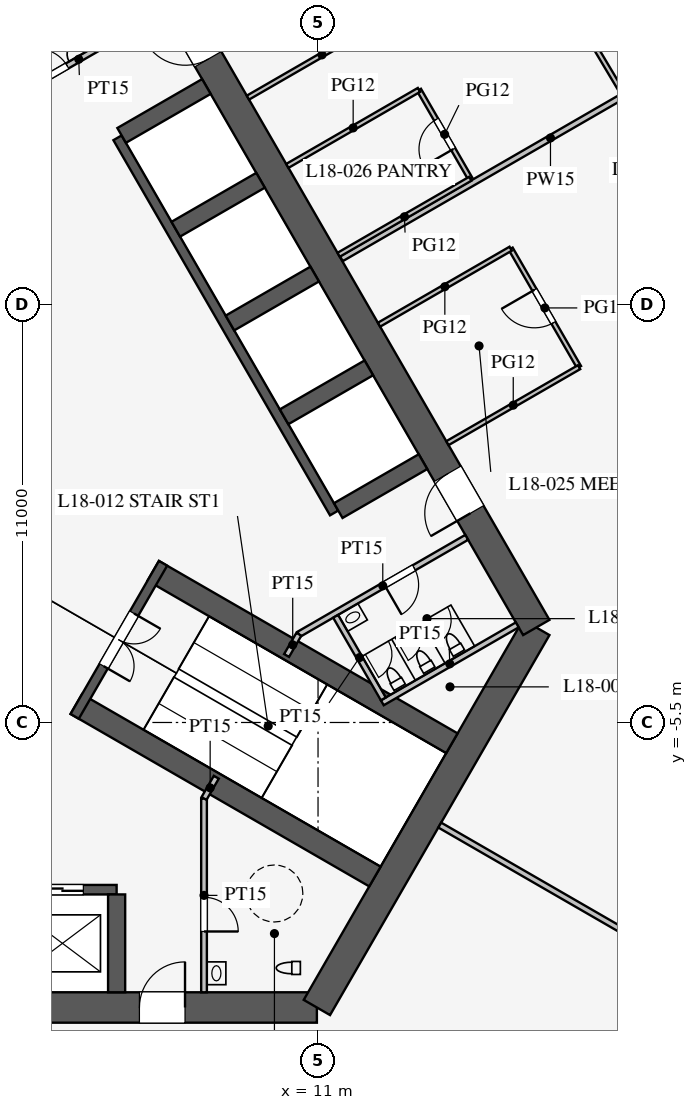
"""IFC4 building model, lengths in metres.
Left out: names, types, materials, properties, quantities, classifications, styles, units other than length and angle.
Written with IfcOpenShell. Run it as: python <this file> out.ifc"""

import sys

from ifc_helpers import new_model, si_unit, direction, frame, frame_2d, origin, place, context, subcontext, project, spatial, rectangle, extrude, element, fill, save


model = new_model("IFC4")
c1 = context("Model", 3, precision=1e-05, world=origin(), true_north=direction((0.0, 1.0)))
c2 = subcontext(c1, "Body", "Model", "MODEL_VIEW")
j1 = project(units=[si_unit("LENGTHUNIT", "METRE"), si_unit("PLANEANGLEUNIT", "RADIAN")], contexts=[c1])
p1 = place(None, origin())
s1 = spatial("IfcSite", under=j1, at=p1, CompositionType="ELEMENT")
p2 = place(p1, origin())
s2 = spatial("IfcBuilding", under=s1, at=p2, CompositionType="ELEMENT")
p3 = place(p2, frame((0.0, 0.0, 79.5)))
s3 = spatial("IfcBuildingStorey", under=s2, at=p3, CompositionType="ELEMENT", Elevation=79.5)
p4 = place(p3, frame((-10.97, -13.0, 0.0), z_axis=(0.0, 0.0, 1.0), x_axis=(1.0, 0.0, 0.0)))
e1 = element("IfcWall", 1, at=p4, inside=s3, PredefinedType="SHEAR", context=c2, shape_type="SweptSolid", body=[
    extrude(rectangle(XDim=21.939, YDim=0.8, at=frame_2d((10.97, 0.0))), origin(), (0.0, 0.0, 1.0), 4.2),
])
p5 = place(p4, frame((17.27, 0.0, 0.0)))
e2 = element("IfcOpeningElement", 2, at=p5, cuts=e1, PredefinedType="OPENING", context=c2, shape_type="SweptSolid", body=[
    extrude(rectangle(XDim=1.2, YDim=2.1, at=frame_2d((0.6, 1.05))), frame((0.0, 0.41, 0.0), z_axis=(0.0, -1.0, 0.0), x_axis=(1.0, 0.0, 0.0)), (0.0, 0.0, 1.0), 0.82),
])
p6 = place(p4, frame((3.47, 0.0, 0.0)))
e3 = element("IfcOpeningElement", 3, at=p6, cuts=e1, PredefinedType="OPENING", context=c2, shape_type="SweptSolid", body=[
    extrude(rectangle(XDim=1.2, YDim=2.1, at=frame_2d((0.6, 1.05))), frame((0.0, 0.41, 0.0), z_axis=(0.0, -1.0, 0.0), x_axis=(1.0, 0.0, 0.0)), (0.0, 0.0, 1.0), 0.82),
])
p7 = place(p3, frame((10.97, -13.0, 0.0), z_axis=(0.0, 0.0, 1.0), x_axis=(0.499995765644, 0.866027848477, 0.0)))
e4 = element("IfcWall", 4, at=p7, inside=s3, PredefinedType="SHEAR", context=c2, shape_type="SweptSolid", body=[
    extrude(rectangle(XDim=11.547, YDim=0.8, at=frame_2d((5.773, 0.0))), origin(), (0.0, 0.0, 1.0), 4.2),
])
p8 = place(p3, frame((16.743, -3.0, 0.0), z_axis=(0.0, 0.0, 1.0), x_axis=(-0.500002442456, 0.866023993627, 0.0)))
e5 = element("IfcWall", 5, at=p8, inside=s3, PredefinedType="SHEAR", context=c2, shape_type="SweptSolid", body=[
    extrude(rectangle(XDim=21.939, YDim=0.8, at=frame_2d((10.97, 0.0))), origin(), (0.0, 0.0, 1.0), 4.2),
])
p9 = place(p8, frame((17.27, 0.0, 0.0)))
e6 = element("IfcOpeningElement", 6, at=p9, cuts=e5, PredefinedType="OPENING", context=c2, shape_type="SweptSolid", body=[
    extrude(rectangle(XDim=1.2, YDim=2.1, at=frame_2d((0.6, 1.05))), frame((0.0, 0.41, 0.0), z_axis=(0.0, -1.0, 0.0), x_axis=(1.0, 0.0, 0.0)), (0.0, 0.0, 1.0), 0.82),
])
p10 = place(p8, frame((3.47, 0.0, 0.0)))
e7 = element("IfcOpeningElement", 7, at=p10, cuts=e5, PredefinedType="OPENING", context=c2, shape_type="SweptSolid", body=[
    extrude(rectangle(XDim=1.2, YDim=2.1, at=frame_2d((0.6, 1.05))), frame((0.0, 0.41, 0.0), z_axis=(0.0, -1.0, 0.0), x_axis=(1.0, 0.0, 0.0)), (0.0, 0.0, 1.0), 0.82),
])
p11 = place(p3, frame((-5.7, -9.9, 0.0), z_axis=(0.0, 0.0, 1.0), x_axis=(1.0, 0.0, 0.0)))
e8 = element("IfcWall", 8, at=p11, inside=s3, PredefinedType="SHEAR", context=c2, shape_type="SweptSolid", body=[
    extrude(rectangle(XDim=11.4, YDim=0.25, at=frame_2d((5.7, 0.0))), origin(), (0.0, 0.0, 1.0), 4.2),
])
p12 = place(p11, frame((0.875, 0.0, 0.0)))
e9 = element("IfcOpeningElement", 9, at=p12, cuts=e8, PredefinedType="OPENING", context=c2, shape_type="SweptSolid", body=[
    extrude(rectangle(XDim=1.1, YDim=2.2, at=frame_2d((0.55, 1.1))), frame((0.0, 0.135, 0.0), z_axis=(0.0, -1.0, 0.0), x_axis=(1.0, 0.0, 0.0)), (0.0, 0.0, 1.0), 0.27),
])
p13 = place(p11, frame((3.725, 0.0, 0.0)))
e10 = element("IfcOpeningElement", 10, at=p13, cuts=e8, PredefinedType="OPENING", context=c2, shape_type="SweptSolid", body=[
    extrude(rectangle(XDim=1.1, YDim=2.2, at=frame_2d((0.55, 1.1))), frame((0.0, 0.135, 0.0), z_axis=(0.0, -1.0, 0.0), x_axis=(1.0, 0.0, 0.0)), (0.0, 0.0, 1.0), 0.27),
])
p14 = place(p11, frame((6.575, 0.0, 0.0)))
e11 = element("IfcOpeningElement", 11, at=p14, cuts=e8, PredefinedType="OPENING", context=c2, shape_type="SweptSolid", body=[
    extrude(rectangle(XDim=1.1, YDim=2.2, at=frame_2d((0.55, 1.1))), frame((0.0, 0.135, 0.0), z_axis=(0.0, -1.0, 0.0), x_axis=(1.0, 0.0, 0.0)), (0.0, 0.0, 1.0), 0.27),
])
p15 = place(p11, frame((9.425, 0.0, 0.0)))
e12 = element("IfcOpeningElement", 12, at=p15, cuts=e8, PredefinedType="OPENING", context=c2, shape_type="SweptSolid", body=[
    extrude(rectangle(XDim=1.1, YDim=2.2, at=frame_2d((0.55, 1.1))), frame((0.0, 0.135, 0.0), z_axis=(0.0, -1.0, 0.0), x_axis=(1.0, 0.0, 0.0)), (0.0, 0.0, 1.0), 0.27),
])
p16 = place(p3, frame((5.7, -10.025, 0.0), z_axis=(0.0, 0.0, 1.0), x_axis=(0.0, -1.0, 0.0)))
e13 = element("IfcWall", 13, at=p16, inside=s3, PredefinedType="SHEAR", context=c2, shape_type="SweptSolid", body=[
    extrude(rectangle(XDim=2.575, YDim=0.45, at=frame_2d((1.288, 0.0))), origin(), (0.0, 0.0, 1.0), 4.2),
])
p17 = place(p3, frame((11.424, 0.014, 0.0), z_axis=(0.0, 0.0, 1.0), x_axis=(-0.500001763848, 0.866024385424, 0.0)))
e14 = element("IfcWall", 14, at=p17, inside=s3, PredefinedType="SHEAR", context=c2, shape_type="SweptSolid", body=[
    extrude(rectangle(XDim=11.4, YDim=0.25, at=frame_2d((5.7, 0.0))), origin(), (0.0, 0.0, 1.0), 4.2),
])
for number, where, z_axis, x_axis in (
    (15, (11.532, 0.076, 0.0), (0.0, 0.0, 1.0), (0.866, 0.5, 0.0)),
    (16, (10.107, 2.544, 0.0), (0.0, 0.0, 1.0), (0.866, 0.5, 0.0)),
    (17, (8.682, 5.012, 0.0), (0.0, 0.0, 1.0), (0.866, 0.5, 0.0)),
    (18, (7.257, 7.481, 0.0), (0.0, 0.0, 1.0), (0.866, 0.5, 0.0)),
):
    element("IfcWall", number, at=place(p3, frame(where, z_axis=z_axis, x_axis=x_axis)), inside=s3, PredefinedType="SHEAR", context=c2, shape_type="SweptSolid", body=[
        extrude(rectangle(XDim=2.575, YDim=0.45, at=frame_2d((1.288, 0.0))), origin(), (0.0, 0.0, 1.0), 4.2),
    ])
p18 = place(p3, frame((5.832, 9.949, 0.0), z_axis=(0.0, 0.0, 1.0), x_axis=(0.866029291668, 0.499993265928, 0.0)))
e19 = element("IfcWall", 19, at=p18, inside=s3, PredefinedType="SHEAR", context=c2, shape_type="SweptSolid", body=[
    extrude(rectangle(XDim=2.575, YDim=0.45, at=frame_2d((1.288, 0.0))), origin(), (0.0, 0.0, 1.0), 4.2),
])
for number, where, z_axis, x_axis in (
    (20, (4.638, -5.016, 0.0), (0.0, 0.0, 1.0), (0.866, -0.5, 0.0)),
    (21, (6.663, -1.509, 0.0), (0.0, 0.0, 1.0), (0.866, -0.5, 0.0)),
):
    element("IfcWall", number, at=place(p3, frame(where, z_axis=z_axis, x_axis=x_axis)), inside=s3, PredefinedType="SHEAR", context=c2, shape_type="SweptSolid", body=[
        extrude(rectangle(XDim=9.075, YDim=0.6, at=frame_2d((4.538, 0.0))), origin(), (0.0, 0.0, 1.0), 4.2),
    ])
p19 = place(p3, frame((4.597, -5.339, 0.0), z_axis=(0.0, 0.0, 1.0), x_axis=(0.499984536904, 0.866034331223, 0.0)))
e22 = element("IfcWall", 22, at=p19, inside=s3, PredefinedType="SHEAR", context=c2, shape_type="SweptSolid", body=[
    extrude(rectangle(XDim=4.65, YDim=0.25, at=frame_2d((2.325, 0.0))), origin(), (0.0, 0.0, 1.0), 4.2),
])
p20 = place(p19, frame((1.525, 0.0, 0.0)))
e23 = element("IfcOpeningElement", 23, at=p20, cuts=e22, PredefinedType="OPENING", context=c2, shape_type="SweptSolid", body=[
    extrude(rectangle(XDim=1.6, YDim=2.1, at=frame_2d((0.8, 1.05))), frame((0.0, 0.135, 0.0), z_axis=(0.0, -1.0, 0.0), x_axis=(1.0, 0.0, 0.0)), (0.0, 0.0, 1.0), 0.27),
])
p21 = place(p3, frame((8.0, -7.5, 0.0), z_axis=(0.0, 0.0, 1.0), x_axis=(0.0, -1.0, 0.0)))
e24 = element("IfcWall", 24, at=p21, inside=s3, PredefinedType="PARTITIONING", context=c2, shape_type="SweptSolid", body=[
    extrude(rectangle(XDim=5.1, YDim=0.15, at=frame_2d((2.55, 0.0))), origin(), (0.0, 0.0, 1.0), 4.0),
])
p22 = place(p21, frame((2.6, 0.0, 0.0)))
e25 = element("IfcOpeningElement", 25, at=p22, cuts=e24, PredefinedType="OPENING", context=c2, shape_type="SweptSolid", body=[
    extrude(rectangle(XDim=0.9, YDim=2.1, at=frame_2d((0.45, 1.05))), frame((0.0, 0.085, 0.0), z_axis=(0.0, -1.0, 0.0), x_axis=(1.0, 0.0, 0.0)), (0.0, 0.0, 1.0), 0.17),
])
p23 = place(p3, frame((2.495, 10.678, 0.0), z_axis=(0.0, 0.0, 1.0), x_axis=(0.86602216432, 0.500005610874, 0.0)))
e26 = element("IfcWall", 26, at=p23, inside=s3, PredefinedType="PARTITIONING", context=c2, shape_type="SweptSolid", body=[
    extrude(rectangle(XDim=5.1, YDim=0.15, at=frame_2d((2.55, 0.0))), origin(), (0.0, 0.0, 1.0), 4.0),
])
p24 = place(p23, frame((1.3, 0.0, 0.0)))
e27 = element("IfcOpeningElement", 27, at=p24, cuts=e26, PredefinedType="OPENING", context=c2, shape_type="SweptSolid", body=[
    extrude(rectangle(XDim=0.9, YDim=2.1, at=frame_2d((0.45, 1.05))), frame((0.0, 0.085, 0.0), z_axis=(0.0, -1.0, 0.0), x_axis=(1.0, 0.0, 0.0)), (0.0, 0.0, 1.0), 0.17),
])
p25 = place(p3, frame((10.495, -3.178, 0.0), z_axis=(0.0, 0.0, 1.0), x_axis=(0.86602216432, 0.500005610874, 0.0)))
e28 = element("IfcWall", 28, at=p25, inside=s3, PredefinedType="PARTITIONING", context=c2, shape_type="SweptSolid", body=[
    extrude(rectangle(XDim=5.1, YDim=0.15, at=frame_2d((2.55, 0.0))), origin(), (0.0, 0.0, 1.0), 4.0),
])
p26 = place(p25, frame((2.6, 0.0, 0.0)))
e29 = element("IfcOpeningElement", 29, at=p26, cuts=e28, PredefinedType="OPENING", context=c2, shape_type="SweptSolid", body=[
    extrude(rectangle(XDim=0.9, YDim=2.1, at=frame_2d((0.45, 1.05))), frame((0.0, 0.085, 0.0), z_axis=(0.0, -1.0, 0.0), x_axis=(1.0, 0.0, 0.0)), (0.0, 0.0, 1.0), 0.17),
])
for number, where, z_axis, x_axis in (
    (30, (8.0, -7.5, 0.0), (0.0, 0.0, 1.0), (0.5, 0.866, 0.0)),
    (31, (10.495, -3.178, 0.0), (0.0, 0.0, 1.0), (-0.5, -0.866, 0.0)),
):
    element("IfcWall", number, at=place(p3, frame(where, z_axis=z_axis, x_axis=x_axis)), inside=s3, PredefinedType="PARTITIONING", context=c2, shape_type="SweptSolid", body=[
        extrude(rectangle(XDim=0.645, YDim=0.15, at=frame_2d((0.323, 0.0))), origin(), (0.0, 0.0, 1.0), 4.0),
    ])
p27 = place(p3, frame((12.691, -4.982, 0.0), z_axis=(0.0, 0.0, 1.0), x_axis=(0.8660249478, 0.500000789788, 0.0)))
e32 = element("IfcWall", 32, at=p27, inside=s3, PredefinedType="PARTITIONING", context=c2, shape_type="SweptSolid", body=[
    extrude(rectangle(XDim=4.1, YDim=0.15, at=frame_2d((2.05, 0.0))), origin(), (0.0, 0.0, 1.0), 4.0),
])
p28 = place(p3, frame((11.464, -2.706, 0.0), z_axis=(0.0, 0.0, 1.0), x_axis=(0.50001992892, -0.866013897511, 0.0)))
e33 = element("IfcWall", 33, at=p28, inside=s3, PredefinedType="PARTITIONING", context=c2, shape_type="SweptSolid", body=[
    extrude(rectangle(XDim=2.51, YDim=0.15, at=frame_2d((1.255, 0.0))), origin(), (0.0, 0.0, 1.0), 4.0),
])
p29 = place(p3, frame((14.203, -8.2, 0.0), z_axis=(0.0, 0.0, 1.0), x_axis=(0.866024965723, -0.500000758745, 0.0)))
e34 = element("IfcWall", 34, at=p29, inside=s3, PredefinedType="PARTITIONING", context=c2, shape_type="SweptSolid", body=[
    extrude(rectangle(XDim=18.25, YDim=0.15, at=frame_2d((9.125, 0.0))), origin(), (0.0, 0.0, 1.0), 2.3),
])
p30 = place(p3, frame((11.613, 6.705, 0.0), z_axis=(0.0, 0.0, 1.0), x_axis=(0.866029791586, 0.499992400027, 0.0)))
e35 = element("IfcWall", 35, at=p30, inside=s3, PredefinedType="PARTITIONING", context=c2, shape_type="SweptSolid", body=[
    extrude(rectangle(XDim=12.709, YDim=0.15, at=frame_2d((6.354, 0.0))), origin(), (0.0, 0.0, 1.0), 2.8),
])
p31 = place(p3, frame((15.006, 8.808, 0.0), z_axis=(0.0, 0.0, 1.0), x_axis=(-0.500048589285, 0.86599734893, 0.0)))
e36 = element("IfcWall", 36, at=p31, inside=s3, PredefinedType="PARTITIONING", context=c2, shape_type="SweptSolid", body=[
    extrude(rectangle(XDim=2.7, YDim=0.12, at=frame_2d((1.35, 0.0))), origin(), (0.0, 0.0, 1.0), 2.9),
])
p32 = place(p31, frame((0.9, 0.0, 0.15)))
e37 = element("IfcOpeningElement", 37, at=p32, cuts=e36, PredefinedType="OPENING", context=c2, shape_type="SweptSolid", body=[
    extrude(rectangle(XDim=0.9, YDim=2.1, at=frame_2d((0.45, 1.05))), frame((0.0, 0.07, 0.0), z_axis=(0.0, -1.0, 0.0), x_axis=(1.0, 0.0, 0.0)), (0.0, 0.0, 1.0), 0.14),
])
p33 = place(p3, frame((17.869, 3.85, 0.0), z_axis=(0.0, 0.0, 1.0), x_axis=(-0.500012057535, 0.866018442252, 0.0)))
e38 = element("IfcWall", 38, at=p33, inside=s3, PredefinedType="PARTITIONING", context=c2, shape_type="SweptSolid", body=[
    extrude(rectangle(XDim=3.6, YDim=0.12, at=frame_2d((1.8, 0.0))), origin(), (0.0, 0.0, 1.0), 2.9),
])
p34 = place(p33, frame((1.35, 0.0, 0.15)))
e39 = element("IfcOpeningElement", 39, at=p34, cuts=e38, PredefinedType="OPENING", context=c2, shape_type="SweptSolid", body=[
    extrude(rectangle(XDim=1.0, YDim=2.1, at=frame_2d((0.5, 1.05))), frame((0.0, 0.07, 0.0), z_axis=(0.0, -1.0, 0.0), x_axis=(1.0, 0.0, 0.0)), (0.0, 0.0, 1.0), 0.14),
])
p35 = place(p3, frame((11.542, 6.808, 0.0), z_axis=(0.0, 0.0, 1.0), x_axis=(0.866026010844, 0.49999894854, 0.0)))
e40 = element("IfcWall", 40, at=p35, inside=s3, PredefinedType="PARTITIONING", context=c2, shape_type="SweptSolid", body=[
    extrude(rectangle(XDim=4.0, YDim=0.12, at=frame_2d((2.0, 0.0))), origin(), (0.0, 0.0, 1.0), 2.8),
])
p36 = place(p3, frame((10.192, 9.146, 0.0), z_axis=(0.0, 0.0, 1.0), x_axis=(0.866026010844, 0.49999894854, 0.0)))
e41 = element("IfcWall", 41, at=p36, inside=s3, PredefinedType="PARTITIONING", context=c2, shape_type="SweptSolid", body=[
    extrude(rectangle(XDim=4.0, YDim=0.12, at=frame_2d((2.0, 0.0))), origin(), (0.0, 0.0, 1.0), 2.9),
])
p37 = place(p3, frame((9.155, 10.944, 0.0), z_axis=(0.0, 0.0, 1.0), x_axis=(0.866017533419, 0.500013631625, 0.0)))
e42 = element("IfcWall", 42, at=p37, inside=s3, PredefinedType="PARTITIONING", context=c2, shape_type="SweptSolid", body=[
    extrude(rectangle(XDim=4.5, YDim=0.12, at=frame_2d((2.25, 0.0))), origin(), (0.0, 0.0, 1.0), 2.9),
])
for number, where, z_axis, x_axis in (
    (43, (12.605, 4.968, 0.0), (0.0, 0.0, 1.0), (0.866, 0.5, 0.0)),
    (44, (14.405, 1.85, 0.0), (0.0, 0.0, 1.0), (0.866, 0.5, 0.0)),
):
    element("IfcWall", number, at=place(p3, frame(where, z_axis=z_axis, x_axis=x_axis)), inside=s3, PredefinedType="PARTITIONING", context=c2, shape_type="SweptSolid", body=[
        extrude(rectangle(XDim=4.0, YDim=0.12, at=frame_2d((2.0, 0.0))), origin(), (0.0, 0.0, 1.0), 2.9),
    ])
p38 = place(p3, frame((19.052, 10.999, 0.0), z_axis=(0.0, 0.0, 1.0), x_axis=(-0.51252396108, 0.858672923364, 0.0)))
e45 = element("IfcWall", 45, at=p38, inside=s3, PredefinedType="PARTITIONING", context=c2, shape_type="SweptSolid", body=[
    extrude(rectangle(XDim=4.5, YDim=0.12, at=frame_2d((2.25, 0.0))), origin(), (0.0, 0.0, 1.0), 2.9),
])
p39 = place(p38, frame((1.8, 0.0, 0.15)))
e46 = element("IfcOpeningElement", 46, at=p39, cuts=e45, PredefinedType="OPENING", context=c2, shape_type="SweptSolid", body=[
    extrude(rectangle(XDim=0.9, YDim=2.1, at=frame_2d((0.45, 1.05))), frame((0.0, 0.07, 0.0), z_axis=(0.0, -1.0, 0.0), x_axis=(1.0, 0.0, 0.0)), (0.0, 0.0, 1.0), 0.14),
])
p40 = place(p22, origin())
e47 = element("IfcDoor", 47, at=p40, inside=s3, OperationType="SINGLE_SWING_RIGHT", PredefinedType="DOOR", context=c2, shape_type="SweptSolid", body=[
    extrude(rectangle(XDim=0.9, YDim=2.1, at=frame_2d((0.45, 1.05))), frame((0.0, 0.025, 0.0), z_axis=(0.0, -1.0, 0.0), x_axis=(1.0, 0.0, 0.0)), (0.0, 0.0, 1.0), 0.05),
])
fill(e25, e47)
p41 = place(p24, origin())
e48 = element("IfcDoor", 48, at=p41, inside=s3, OperationType="SINGLE_SWING_LEFT", PredefinedType="DOOR", context=c2, shape_type="SweptSolid", body=[
    extrude(rectangle(XDim=0.9, YDim=2.1, at=frame_2d((0.45, 1.05))), frame((0.0, 0.025, 0.0), z_axis=(0.0, -1.0, 0.0), x_axis=(1.0, 0.0, 0.0)), (0.0, 0.0, 1.0), 0.05),
])
fill(e27, e48)
p42 = place(p26, frame((0.9, 0.0, 0.0), z_axis=(0.0, 0.0, 1.0), x_axis=(-1.0, 0.0, 0.0)))
e49 = element("IfcDoor", 49, at=p42, inside=s3, OperationType="SINGLE_SWING_RIGHT", PredefinedType="DOOR", context=c2, shape_type="SweptSolid", body=[
    extrude(rectangle(XDim=0.9, YDim=2.1, at=frame_2d((0.45, 1.05))), frame((0.0, 0.025, 0.0), z_axis=(0.0, -1.0, 0.0), x_axis=(1.0, 0.0, 0.0)), (0.0, 0.0, 1.0), 0.05),
])
fill(e29, e49)
p43 = place(p20, frame((1.6, 0.0, 0.0), z_axis=(0.0, 0.0, 1.0), x_axis=(-1.0, 0.0, 0.0)))
e50 = element("IfcDoor", 50, at=p43, inside=s3, OperationType="DOUBLE_DOOR_SINGLE_SWING", PredefinedType="DOOR", context=c2, shape_type="SweptSolid", body=[
    extrude(rectangle(XDim=1.6, YDim=2.1, at=frame_2d((0.8, 1.05))), frame((0.0, 0.025, 0.0), z_axis=(0.0, -1.0, 0.0), x_axis=(1.0, 0.0, 0.0)), (0.0, 0.0, 1.0), 0.05),
])
fill(e23, e50)
p44 = place(p5, origin())
e51 = element("IfcDoor", 51, at=p44, inside=s3, OperationType="SINGLE_SWING_RIGHT", PredefinedType="DOOR", context=c2, shape_type="SweptSolid", body=[
    extrude(rectangle(XDim=1.2, YDim=2.1, at=frame_2d((0.6, 1.05))), frame((0.0, 0.025, 0.0), z_axis=(0.0, -1.0, 0.0), x_axis=(1.0, 0.0, 0.0)), (0.0, 0.0, 1.0), 0.05),
])
fill(e2, e51)
p45 = place(p9, origin())
e52 = element("IfcDoor", 52, at=p45, inside=s3, OperationType="SINGLE_SWING_RIGHT", PredefinedType="DOOR", context=c2, shape_type="SweptSolid", body=[
    extrude(rectangle(XDim=1.2, YDim=2.1, at=frame_2d((0.6, 1.05))), frame((0.0, 0.025, 0.0), z_axis=(0.0, -1.0, 0.0), x_axis=(1.0, 0.0, 0.0)), (0.0, 0.0, 1.0), 0.05),
])
fill(e6, e52)
p46 = place(p10, origin())
e53 = element("IfcDoor", 53, at=p46, inside=s3, OperationType="SINGLE_SWING_LEFT", PredefinedType="DOOR", context=c2, shape_type="SweptSolid", body=[
    extrude(rectangle(XDim=1.2, YDim=2.1, at=frame_2d((0.6, 1.05))), frame((0.0, 0.025, 0.0), z_axis=(0.0, -1.0, 0.0), x_axis=(1.0, 0.0, 0.0)), (0.0, 0.0, 1.0), 0.05),
])
fill(e7, e53)
p47 = place(p34, origin())
e54 = element("IfcDoor", 54, at=p47, inside=s3, OperationType="SINGLE_SWING_RIGHT", PredefinedType="DOOR", context=c2, shape_type="SweptSolid", body=[
    extrude(rectangle(XDim=1.0, YDim=2.1, at=frame_2d((0.5, 1.05))), frame((0.0, 0.025, 0.0), z_axis=(0.0, -1.0, 0.0), x_axis=(1.0, 0.0, 0.0)), (0.0, 0.0, 1.0), 0.05),
])
fill(e39, e54)
p48 = place(p32, origin())
e55 = element("IfcDoor", 55, at=p48, inside=s3, OperationType="SINGLE_SWING_LEFT", PredefinedType="DOOR", context=c2, shape_type="SweptSolid", body=[
    extrude(rectangle(XDim=0.9, YDim=2.1, at=frame_2d((0.45, 1.05))), frame((0.0, 0.025, 0.0), z_axis=(0.0, -1.0, 0.0), x_axis=(1.0, 0.0, 0.0)), (0.0, 0.0, 1.0), 0.05),
])
fill(e37, e55)
p49 = place(p15, origin())
e56 = element("IfcDoor", 56, at=p49, inside=s3, OperationType="DOUBLE_DOOR_SLIDING", PredefinedType="DOOR", context=c2, shape_type="SweptSolid", body=[
    extrude(rectangle(XDim=1.1, YDim=2.2, at=frame_2d((0.55, 1.1))), frame((0.0, 0.025, 0.0), z_axis=(0.0, -1.0, 0.0), x_axis=(1.0, 0.0, 0.0)), (0.0, 0.0, 1.0), 0.05),
])
fill(e12, e56)
save(model, sys.argv[1])
